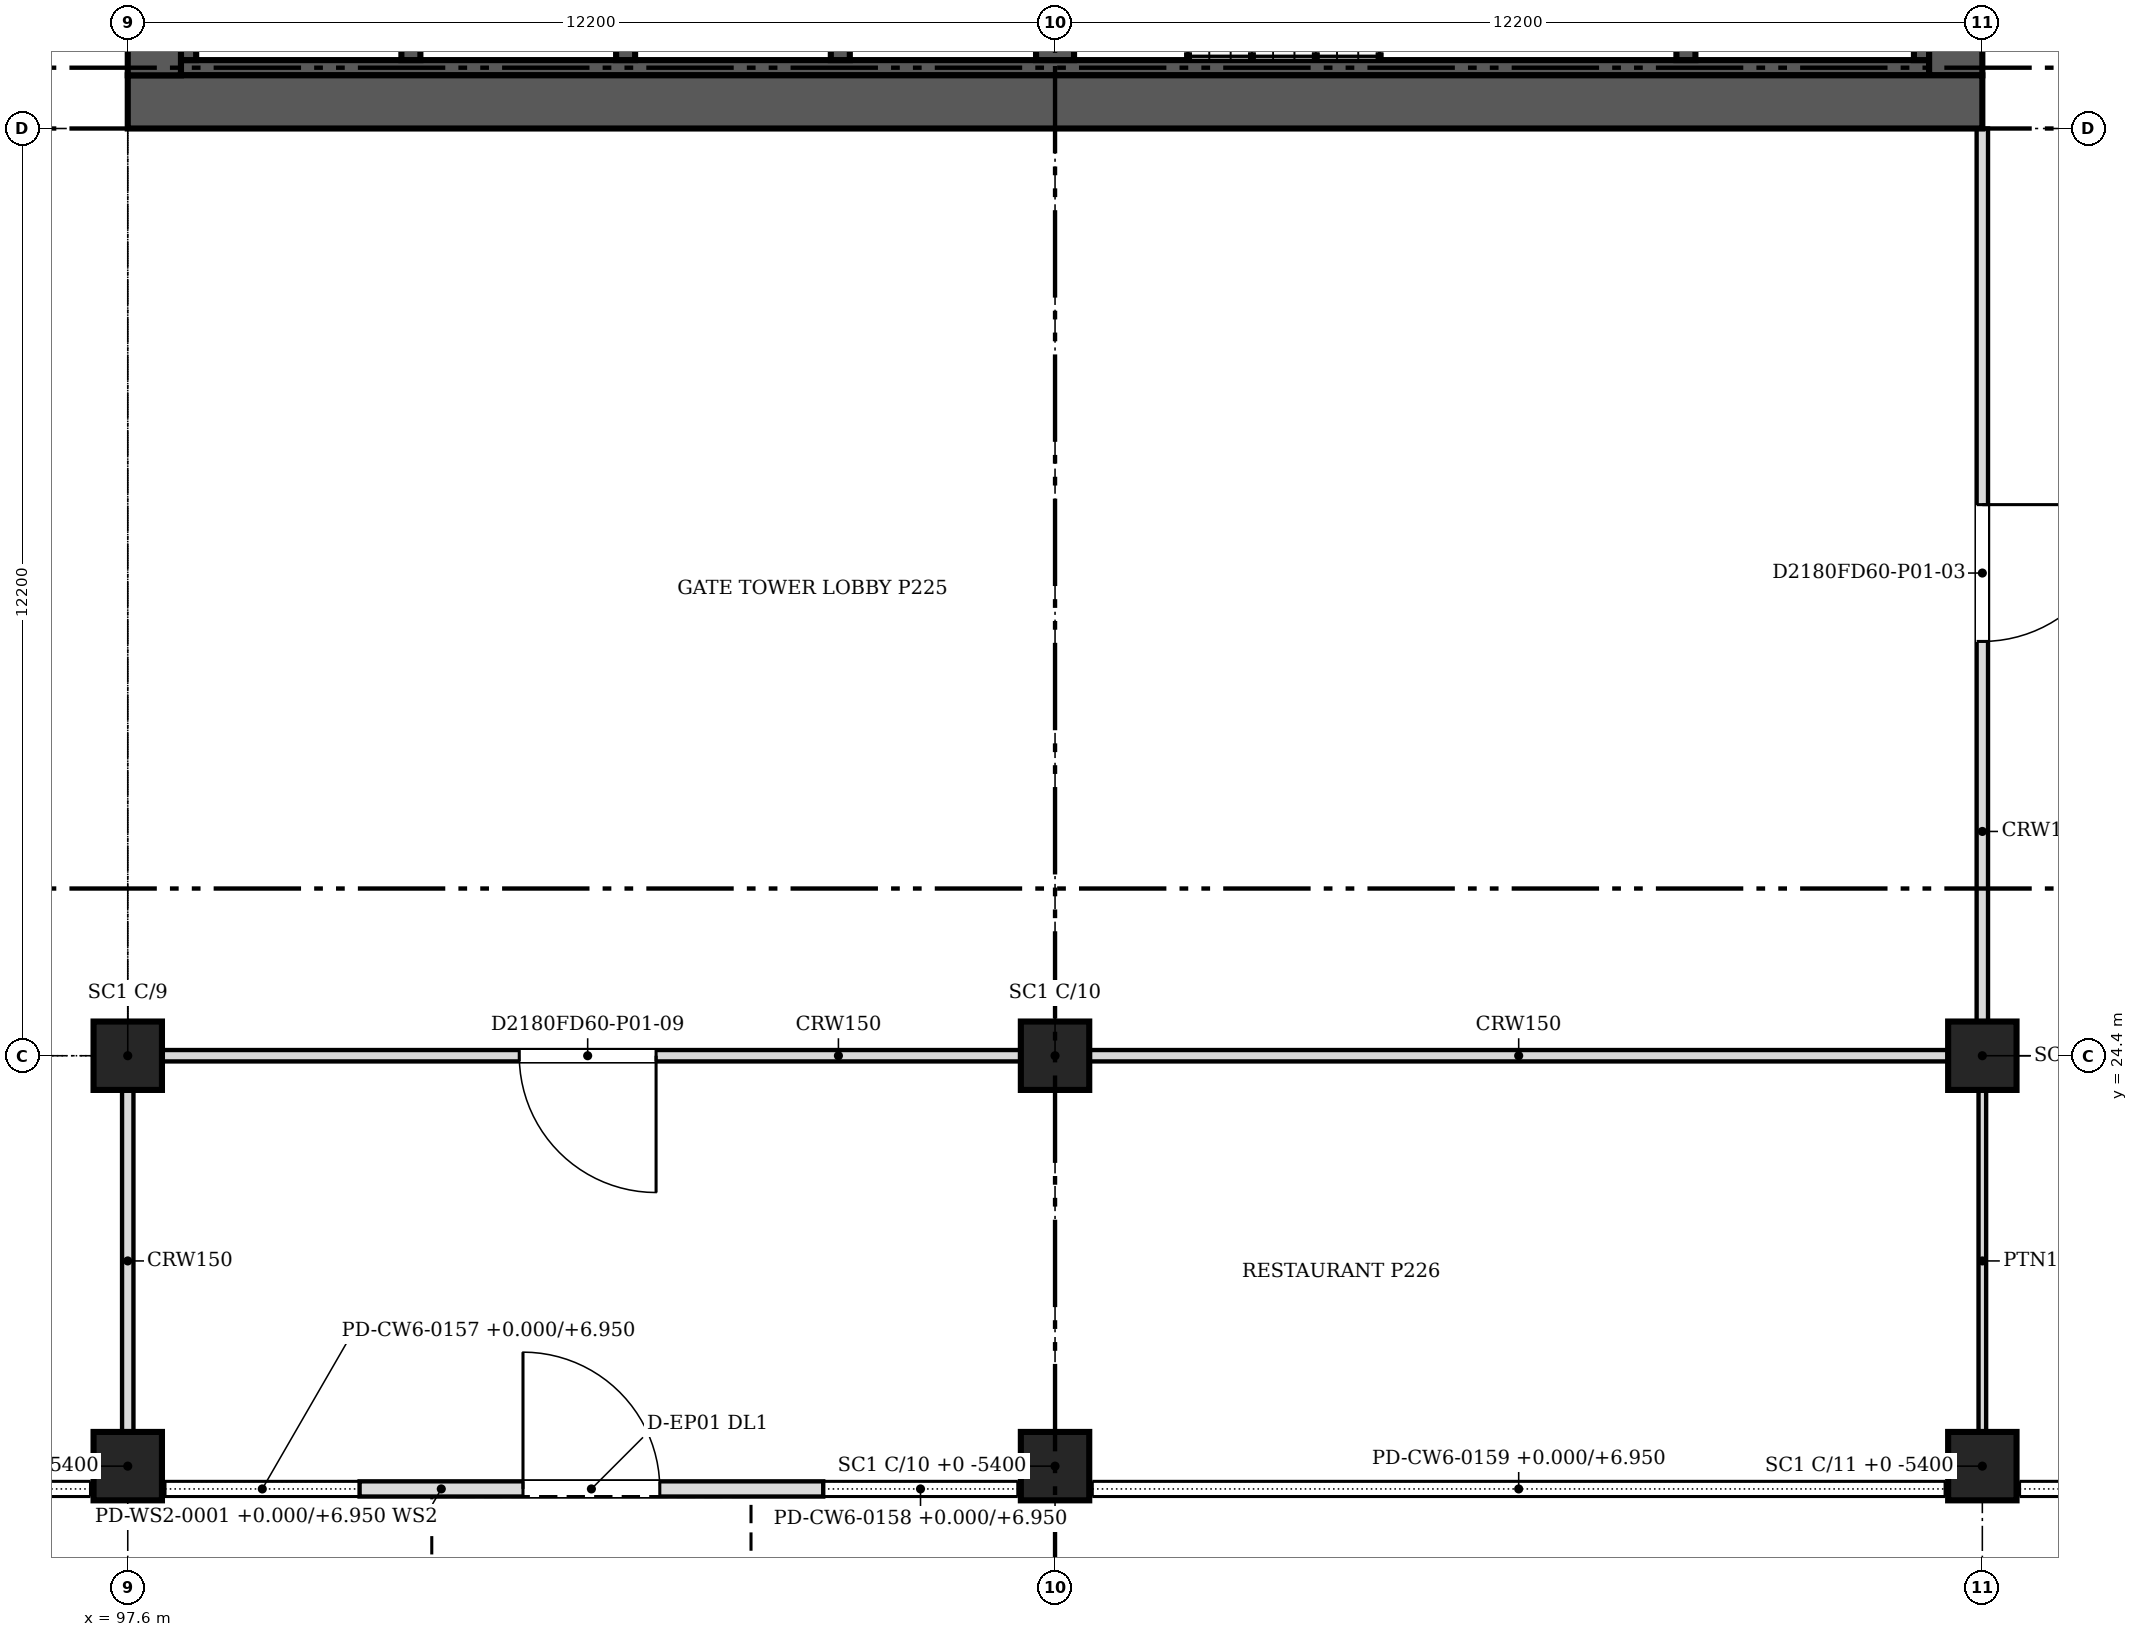
"""IFC4 building model, lengths in metres.
Left out: names, types, materials, properties, quantities, classifications, styles, units other than length and angle.
Written with IfcOpenShell. Run it as: python <this file> out.ifc"""

import sys

from ifc_helpers import new_model, si_unit, direction, frame, frame_2d, origin, origin_2d, place, context, subcontext, project, spatial, polyline, rectangle, outline, extrude, source, transform, mapped, element, fill, save


model = new_model("IFC4")
c1 = context("Model", 3, precision=1e-05, world=origin(), true_north=direction((0.0, 1.0)))
c2 = subcontext(c1, "Body", "Model", "MODEL_VIEW")
j1 = project(units=[si_unit("LENGTHUNIT", "METRE"), si_unit("PLANEANGLEUNIT", "RADIAN")], contexts=[c1])
p1 = place(None, origin())
s1 = spatial("IfcSite", under=j1, at=p1, CompositionType="ELEMENT")
p2 = place(p1, origin())
s2 = spatial("IfcBuilding", under=s1, at=p2, CompositionType="ELEMENT")
p3 = place(p2, origin())
s3 = spatial("IfcBuildingStorey", under=s2, at=p3, CompositionType="ELEMENT", Elevation=0.0)
for number, where, z_axis, x_axis in (
    (1, (97.6, 24.4, 0.0), (0.0, 0.0, 1.0), (1.0, 0.0, 0.0)),
    (2, (109.8, 24.4, 0.0), (0.0, 0.0, 1.0), (1.0, 0.0, 0.0)),
    (3, (122.0, 24.4, 0.0), (0.0, 0.0, 1.0), (1.0, 0.0, 0.0)),
    (4, (97.6, 19.0, 0.0), (0.0, 0.0, 1.0), (1.0, 0.0, 0.0)),
    (5, (109.8, 19.0, 0.0), (0.0, 0.0, 1.0), (1.0, 0.0, 0.0)),
    (6, (122.0, 19.0, 0.0), (0.0, 0.0, 1.0), (1.0, 0.0, 0.0)),
):
    element("IfcColumn", number, at=place(p3, frame(where, z_axis=z_axis, x_axis=x_axis)), inside=s3, PredefinedType="COLUMN", context=c2, shape_type="SweptSolid", body=[
        extrude(rectangle(XDim=0.9, YDim=0.9, at=origin_2d()), origin(), (0.0, 0.0, 1.0), 6.95),
    ])
p4 = place(p3, frame((100.65, 18.7, 0.0), z_axis=(0.0, 0.0, 1.0), x_axis=(1.0, 0.0, 0.0)))
e7 = element("IfcWall", 7, at=p4, inside=s3, PredefinedType="PARTITIONING", context=c2, shape_type="SweptSolid", body=[
    extrude(rectangle(XDim=6.1, YDim=0.2, at=frame_2d((3.05, 0.0))), origin(), (0.0, 0.0, 1.0), 6.95),
])
m1 = source(origin(), c2, "Body", "SweptSolid", [
    extrude(rectangle(XDim=1.8, YDim=3.0, at=frame_2d((0.9, 1.5))), frame((0.0, 0.11, 0.0), z_axis=(0.0, -1.0, 0.0), x_axis=(1.0, 0.0, 0.0)), (0.0, 0.0, 1.0), 0.22),
])
p5 = place(p4, frame((2.15, 0.0, 0.0)))
e8 = element("IfcOpeningElement", 8, at=p5, cuts=e7, PredefinedType="OPENING", context=c2, shape_type="MappedRepresentation", body=[
    mapped(m1, transform((0.0, 0.0, 0.0), scale=1.0)),
])
m2 = source(origin(), c2, "Body", "SweptSolid", [
    extrude(outline(polyline([(0.12, 0.1), (2.03, 0.1), (2.03, 6.85), (0.12, 6.85), (0.12, 0.1)])), frame((0.0, 0.11, 0.0), z_axis=(0.0, -1.0, 0.0), x_axis=(1.0, 0.0, 0.0)), (0.0, 0.0, 1.0), 0.22),
])
p6 = place(p4, origin())
e9 = element("IfcOpeningElement", 9, at=p6, cuts=e7, PredefinedType="OPENING", context=c2, shape_type="MappedRepresentation", body=[
    mapped(m2, transform((0.0, 0.0, 0.0), scale=1.0)),
])
m3 = source(origin(), c2, "Body", "SweptSolid", [
    extrude(outline(polyline([(4.07, 0.1), (5.98, 0.1), (5.98, 6.85), (4.07, 6.85), (4.07, 0.1)])), frame((0.0, 0.11, 0.0), z_axis=(0.0, -1.0, 0.0), x_axis=(1.0, 0.0, 0.0)), (0.0, 0.0, 1.0), 0.22),
])
p7 = place(p4, origin())
e10 = element("IfcOpeningElement", 10, at=p7, cuts=e7, PredefinedType="OPENING", context=c2, shape_type="MappedRepresentation", body=[
    mapped(m3, transform((0.0, 0.0, 0.0), scale=1.0)),
])
m4 = source(origin(), c2, "Body", "SweptSolid", [
    extrude(outline(polyline([(2.15, 3.12), (3.95, 3.12), (3.95, 6.85), (2.15, 6.85), (2.15, 3.12)])), frame((0.0, 0.11, 0.0), z_axis=(0.0, -1.0, 0.0), x_axis=(1.0, 0.0, 0.0)), (0.0, 0.0, 1.0), 0.22),
])
p8 = place(p4, origin())
e11 = element("IfcOpeningElement", 11, at=p8, cuts=e7, PredefinedType="OPENING", context=c2, shape_type="MappedRepresentation", body=[
    mapped(m4, transform((0.0, 0.0, 0.0), scale=1.0)),
])
p9 = place(p3, frame((122.0, 36.95, 0.0), z_axis=(0.0, 0.0, 1.0), x_axis=(-1.0, 0.0, 0.0)))
e12 = element("IfcWall", 12, at=p9, inside=s3, PredefinedType="SHEAR", context=c2, shape_type="SweptSolid", body=[
    extrude(rectangle(XDim=24.4, YDim=0.7, at=frame_2d((12.2, 0.0))), origin(), (0.0, 0.0, 1.0), 7.2),
])
p10 = place(p3, frame((97.95, 37.3, 0.0), z_axis=(0.0, 0.0, 1.0), x_axis=(0.0, 1.0, 0.0)))
e13 = element("IfcWall", 13, at=p10, inside=s3, PredefinedType="SHEAR", context=c2, shape_type="SweptSolid", body=[
    extrude(rectangle(XDim=10.8, YDim=0.7, at=frame_2d((5.4, 0.0))), origin(), (0.0, 0.0, 1.0), 7.2),
])
m5 = source(origin(), c2, "Body", "SweptSolid", [
    extrude(rectangle(XDim=2.1, YDim=2.4, at=frame_2d((1.05, 1.2))), frame((0.0, 0.36, 0.0), z_axis=(0.0, -1.0, 0.0), x_axis=(1.0, 0.0, 0.0)), (0.0, 0.0, 1.0), 0.72),
])
p11 = place(p10, frame((4.5, 0.0, 0.0)))
e14 = element("IfcOpeningElement", 14, at=p11, cuts=e13, PredefinedType="OPENING", context=c2, shape_type="MappedRepresentation", body=[
    mapped(m5, transform((0.0, 0.0, 0.0), scale=1.0)),
])
p12 = place(p3, frame((121.65, 48.1, 0.0), z_axis=(0.0, 0.0, 1.0), x_axis=(0.0, -1.0, 0.0)))
e15 = element("IfcWall", 15, at=p12, inside=s3, PredefinedType="SHEAR", context=c2, shape_type="SweptSolid", body=[
    extrude(rectangle(XDim=10.8, YDim=0.7, at=frame_2d((5.4, 0.0))), origin(), (0.0, 0.0, 1.0), 7.2),
])
m6 = source(origin(), c2, "Body", "SweptSolid", [
    extrude(rectangle(XDim=2.4, YDim=2.1, at=frame_2d((1.2, 1.05))), frame((0.0, 0.36, 0.0), z_axis=(0.0, -1.0, 0.0), x_axis=(1.0, 0.0, 0.0)), (0.0, 0.0, 1.0), 0.72),
])
p13 = place(p12, frame((3.95, 0.0, 0.0)))
e16 = element("IfcOpeningElement", 16, at=p13, cuts=e15, PredefinedType="OPENING", context=c2, shape_type="MappedRepresentation", body=[
    mapped(m6, transform((0.0, 0.0, 0.0), scale=1.0)),
])
p14 = place(p3, frame((98.3, 37.4, 0.0), z_axis=(0.0, 0.0, 1.0), x_axis=(1.0, 0.0, 0.0)))
e17 = element("IfcWall", 17, at=p14, inside=s3, PredefinedType="SOLIDWALL", context=c2, shape_type="SweptSolid", body=[
    extrude(rectangle(XDim=23.0, YDim=0.2, at=frame_2d((11.5, 0.0))), origin(), (0.0, 0.0, 1.0), 7.2),
])
p15 = place(p3, frame((98.4, 37.5, 0.0), z_axis=(0.0, 0.0, 1.0), x_axis=(0.0, 1.0, 0.0)))
e18 = element("IfcWall", 18, at=p15, inside=s3, PredefinedType="SOLIDWALL", context=c2, shape_type="SweptSolid", body=[
    extrude(rectangle(XDim=4.3, YDim=0.2, at=frame_2d((2.15, 0.0))), origin(), (0.0, 0.0, 1.0), 7.2),
])
p16 = place(p3, frame((121.2, 37.5, 0.0), z_axis=(0.0, 0.0, 1.0), x_axis=(0.0, 1.0, 0.0)))
e19 = element("IfcWall", 19, at=p16, inside=s3, PredefinedType="SOLIDWALL", context=c2, shape_type="SweptSolid", body=[
    extrude(rectangle(XDim=4.25, YDim=0.2, at=frame_2d((2.125, 0.0))), origin(), (0.0, 0.0, 1.0), 7.2),
])
p17 = place(p3, frame((109.8, 37.5, 0.0), z_axis=(0.0, 0.0, 1.0), x_axis=(0.0, 1.0, 0.0)))
e20 = element("IfcWall", 20, at=p17, inside=s3, PredefinedType="SHEAR", context=c2, shape_type="SweptSolid", body=[
    extrude(rectangle(XDim=5.7, YDim=0.5, at=frame_2d((2.85, 0.0))), origin(), (0.0, 0.0, 1.0), 7.2),
])
p18 = place(p3, frame((104.15, 37.5, 0.0), z_axis=(0.0, 0.0, 1.0), x_axis=(0.0, 1.0, 0.0)))
e21 = element("IfcWall", 21, at=p18, inside=s3, PredefinedType="SOLIDWALL", context=c2, shape_type="SweptSolid", body=[
    extrude(rectangle(XDim=2.875, YDim=0.25, at=frame_2d((1.438, 0.0))), origin(), (0.0, 0.0, 1.0), 7.2),
])
p19 = place(p3, frame((118.1, 37.5, 0.0), z_axis=(0.0, 0.0, 1.0), x_axis=(0.0, 1.0, 0.0)))
e22 = element("IfcWall", 22, at=p19, inside=s3, PredefinedType="SOLIDWALL", context=c2, shape_type="SweptSolid", body=[
    extrude(rectangle(XDim=3.2, YDim=0.25, at=frame_2d((1.6, 0.0))), origin(), (0.0, 0.0, 1.0), 7.2),
])
for number, where, z_axis, x_axis in (
    (23, (101.325, 37.5, 0.0), (0.0, 0.0, 1.0), (0.0, 1.0, 0.0)),
    (24, (106.975, 37.5, 0.0), (0.0, 0.0, 1.0), (0.0, 1.0, 0.0)),
):
    element("IfcWall", number, at=place(p3, frame(where, z_axis=z_axis, x_axis=x_axis)), inside=s3, PredefinedType="SOLIDWALL", context=c2, shape_type="SweptSolid", body=[
        extrude(rectangle(XDim=2.875, YDim=0.25, at=frame_2d((1.438, 0.0))), origin(), (0.0, 0.0, 1.0), 7.2),
    ])
p20 = place(p3, frame((97.6, 19.451, 0.0), z_axis=(0.0, 0.0, 1.0), x_axis=(0.0, 1.0, 0.0)))
e25 = element("IfcWall", 25, at=p20, inside=s3, PredefinedType="PARTITIONING", context=c2, shape_type="SweptSolid", body=[
    extrude(rectangle(XDim=4.498, YDim=0.15, at=frame_2d((2.249, 0.0))), origin(), (0.0, 0.0, 1.0), 6.115),
])
p21 = place(p3, frame((122.0, 19.451, 0.0), z_axis=(0.0, 0.0, 1.0), x_axis=(0.0, 1.0, 0.0)))
e26 = element("IfcWall", 26, at=p21, inside=s3, PredefinedType="PARTITIONING", context=c2, shape_type="SweptSolid", body=[
    extrude(rectangle(XDim=4.498, YDim=0.1, at=frame_2d((2.249, 0.0))), origin(), (0.0, 0.0, 1.0), 6.115),
])
p22 = place(p3, frame((109.349, 24.4, 0.0), z_axis=(0.0, 0.0, 1.0), x_axis=(-1.0, 0.0, 0.0)))
e27 = element("IfcWall", 27, at=p22, inside=s3, PredefinedType="PARTITIONING", context=c2, shape_type="SweptSolid", body=[
    extrude(rectangle(XDim=11.298, YDim=0.15, at=frame_2d((5.649, 0.0))), origin(), (0.0, 0.0, 1.0), 6.115),
])
m7 = source(origin(), c2, "Body", "SweptSolid", [
    extrude(rectangle(XDim=1.8, YDim=2.1, at=frame_2d((0.9, 1.05))), frame((0.0, 0.085, 0.0), z_axis=(0.0, -1.0, 0.0), x_axis=(1.0, 0.0, 0.0)), (0.0, 0.0, 1.0), 0.17),
])
p23 = place(p22, frame((4.798, 0.0, 0.0)))
e28 = element("IfcOpeningElement", 28, at=p23, cuts=e27, PredefinedType="OPENING", context=c2, shape_type="MappedRepresentation", body=[
    mapped(m7, transform((0.0, 0.0, 0.0), scale=1.0)),
])
p24 = place(p3, frame((110.251, 24.4, 0.0), z_axis=(0.0, 0.0, 1.0), x_axis=(1.0, 0.0, 0.0)))
e29 = element("IfcWall", 29, at=p24, inside=s3, PredefinedType="PARTITIONING", context=c2, shape_type="SweptSolid", body=[
    extrude(rectangle(XDim=11.298, YDim=0.15, at=frame_2d((5.649, 0.0))), origin(), (0.0, 0.0, 1.0), 6.115),
])
p25 = place(p3, frame((122.0, 36.6, 0.0), z_axis=(0.0, 0.0, 1.0), x_axis=(0.0, -1.0, 0.0)))
e30 = element("IfcWall", 30, at=p25, inside=s3, PredefinedType="PARTITIONING", context=c2, shape_type="SweptSolid", body=[
    extrude(rectangle(XDim=11.749, YDim=0.15, at=frame_2d((5.875, 0.0))), origin(), (0.0, 0.0, 1.0), 6.115),
])
p26 = place(p25, frame((4.949, 0.0, 0.0)))
e31 = element("IfcOpeningElement", 31, at=p26, cuts=e30, PredefinedType="OPENING", context=c2, shape_type="MappedRepresentation", body=[
    mapped(m7, transform((0.0, 0.0, 0.0), scale=1.0)),
])
m8 = source(origin(), c2, "Body", "SweptSolid", [
    extrude(rectangle(XDim=1.8, YDim=3.0, at=frame_2d((0.9, 1.5))), frame((0.0, 0.025, 0.0), z_axis=(0.0, -1.0, 0.0), x_axis=(1.0, 0.0, 0.0)), (0.0, 0.0, 1.0), 0.05),
])
p27 = place(p5, origin())
e32 = element("IfcDoor", 32, at=p27, inside=s3, OperationType="DOUBLE_DOOR_SINGLE_SWING", PredefinedType="DOOR", context=c2, shape_type="MappedRepresentation", body=[
    mapped(m8, transform((0.0, 0.0, 0.0), scale=1.0)),
])
fill(e8, e32)
m9 = source(origin(), c2, "Body", "SweptSolid", [
    extrude(rectangle(XDim=1.8, YDim=2.1, at=frame_2d((0.9, 1.05))), frame((0.0, 0.025, 0.0), z_axis=(0.0, -1.0, 0.0), x_axis=(1.0, 0.0, 0.0)), (0.0, 0.0, 1.0), 0.05),
])
p28 = place(p26, origin())
e33 = element("IfcDoor", 33, at=p28, inside=s3, OperationType="DOUBLE_DOOR_SINGLE_SWING", PredefinedType="DOOR", context=c2, shape_type="MappedRepresentation", body=[
    mapped(m9, transform((0.0, 0.0, 0.0), scale=1.0)),
])
fill(e31, e33)
p29 = place(p23, origin())
e34 = element("IfcDoor", 34, at=p29, inside=s3, OperationType="DOUBLE_DOOR_SINGLE_SWING", PredefinedType="DOOR", context=c2, shape_type="MappedRepresentation", body=[
    mapped(m9, transform((0.0, 0.0, 0.0), scale=1.0)),
])
fill(e28, e34)
save(model, sys.argv[1])
